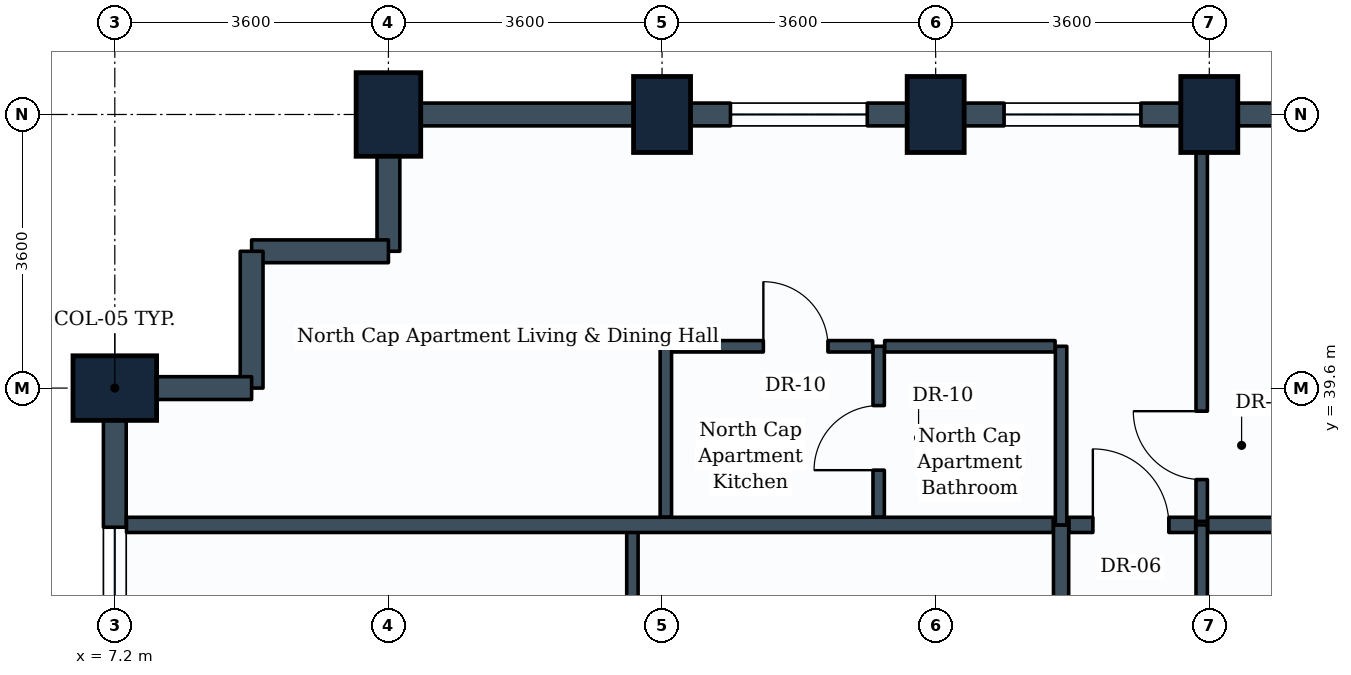
"""IFC4 building model, lengths in metres.
Left out: names, types, materials, properties, quantities, classifications, styles, units other than length and angle.
Written with IfcOpenShell. Run it as: python <this file> out.ifc"""

import sys

from ifc_helpers import new_model, si_unit, direction, frame, frame_2d, origin, origin_2d, place, context, subcontext, project, spatial, rectangle, extrude, element, fill, save


model = new_model("IFC4")
c1 = context("Model", 3, precision=1e-05, world=origin(), true_north=direction((0.0, 1.0)))
c2 = subcontext(c1, "Body", "Model", "MODEL_VIEW")
j1 = project(units=[si_unit("LENGTHUNIT", "METRE"), si_unit("PLANEANGLEUNIT", "RADIAN")], contexts=[c1])
p1 = place(None, origin())
s1 = spatial("IfcSite", under=j1, at=p1, CompositionType="ELEMENT")
p2 = place(p1, origin())
s2 = spatial("IfcBuilding", under=s1, at=p2, CompositionType="ELEMENT")
p3 = place(p2, frame((0.0, 0.0, 142.8)))
s3 = spatial("IfcBuildingStorey", under=s2, at=p3, CompositionType="ELEMENT", Elevation=142.8)
for number, where, z_axis, x_axis in (
    (1, (7.2, 39.6, 0.0), (0.0, 0.0, 1.0), (0.0, 1.0, 0.0)),
    (2, (10.8, 43.2, 0.0), (0.0, 0.0, 1.0), (1.0, 0.0, 0.0)),
):
    element("IfcColumn", number, at=place(p3, frame(where, z_axis=z_axis, x_axis=x_axis)), inside=s3, PredefinedType="COLUMN", context=c2, shape_type="SweptSolid", body=[
        extrude(rectangle(XDim=0.85, YDim=1.1, at=origin_2d()), origin(), (0.0, 0.0, 1.0), 3.8),
    ])
for number, where, z_axis, x_axis in (
    (3, (14.4, 43.2, 0.0), (0.0, 0.0, 1.0), (1.0, 0.0, 0.0)),
    (4, (18.0, 43.2, 0.0), (0.0, 0.0, 1.0), (1.0, 0.0, 0.0)),
    (5, (21.6, 43.2, 0.0), (0.0, 0.0, 1.0), (1.0, 0.0, 0.0)),
):
    element("IfcColumn", number, at=place(p3, frame(where, z_axis=z_axis, x_axis=x_axis)), inside=s3, PredefinedType="COLUMN", context=c2, shape_type="SweptSolid", body=[
        extrude(rectangle(XDim=0.75, YDim=1.0, at=origin_2d()), origin(), (0.0, 0.0, 1.0), 3.8),
    ])
p4 = place(p3, frame((21.6, 43.2, 0.0), z_axis=(0.0, 0.0, 1.0), x_axis=(1.0, 0.0, 0.0)))
e6 = element("IfcWall", 6, at=p4, inside=s3, PredefinedType="STANDARD", context=c2, shape_type="SweptSolid", body=[
    extrude(rectangle(XDim=3.6, YDim=0.3, at=frame_2d((1.8, 0.0))), origin(), (0.0, 0.0, 1.0), 2.93),
])
p5 = place(p4, frame((0.875, 0.0, 0.85)))
e7 = element("IfcOpeningElement", 7, at=p5, cuts=e6, PredefinedType="OPENING", context=c2, shape_type="SweptSolid", body=[
    extrude(rectangle(XDim=1.8, YDim=1.35, at=frame_2d((0.9, 0.675))), frame((0.0, 0.16, 0.0), z_axis=(0.0, -1.0, 0.0), x_axis=(1.0, 0.0, 0.0)), (0.0, 0.0, 1.0), 0.32),
])
p6 = place(p3, frame((18.0, 43.2, 0.0), z_axis=(0.0, 0.0, 1.0), x_axis=(1.0, 0.0, 0.0)))
e8 = element("IfcWall", 8, at=p6, inside=s3, PredefinedType="STANDARD", context=c2, shape_type="SweptSolid", body=[
    extrude(rectangle(XDim=3.6, YDim=0.3, at=frame_2d((1.8, 0.0))), origin(), (0.0, 0.0, 1.0), 2.93),
])
p7 = place(p6, frame((0.9, 0.0, 0.85)))
e9 = element("IfcOpeningElement", 9, at=p7, cuts=e8, PredefinedType="OPENING", context=c2, shape_type="SweptSolid", body=[
    extrude(rectangle(XDim=1.8, YDim=1.35, at=frame_2d((0.9, 0.675))), frame((0.0, 0.16, 0.0), z_axis=(0.0, -1.0, 0.0), x_axis=(1.0, 0.0, 0.0)), (0.0, 0.0, 1.0), 0.32),
])
p8 = place(p3, frame((14.4, 43.2, 0.0), z_axis=(0.0, 0.0, 1.0), x_axis=(1.0, 0.0, 0.0)))
e10 = element("IfcWall", 10, at=p8, inside=s3, PredefinedType="STANDARD", context=c2, shape_type="SweptSolid", body=[
    extrude(rectangle(XDim=3.6, YDim=0.3, at=frame_2d((1.8, 0.0))), origin(), (0.0, 0.0, 1.0), 2.93),
])
p9 = place(p8, frame((0.9, 0.0, 0.85)))
e11 = element("IfcOpeningElement", 11, at=p9, cuts=e10, PredefinedType="OPENING", context=c2, shape_type="SweptSolid", body=[
    extrude(rectangle(XDim=1.8, YDim=1.35, at=frame_2d((0.9, 0.675))), frame((0.0, 0.16, 0.0), z_axis=(0.0, -1.0, 0.0), x_axis=(1.0, 0.0, 0.0)), (0.0, 0.0, 1.0), 0.32),
])
p10 = place(p3, frame((10.8, 43.2, 0.0), z_axis=(0.0, 0.0, 1.0), x_axis=(1.0, 0.0, 0.0)))
e12 = element("IfcWall", 12, at=p10, inside=s3, PredefinedType="STANDARD", context=c2, shape_type="SweptSolid", body=[
    extrude(rectangle(XDim=3.6, YDim=0.3, at=frame_2d((1.8, 0.0))), origin(), (0.0, 0.0, 1.0), 2.93),
])
p11 = place(p3, frame((10.8, 41.4, 0.0), z_axis=(0.0, 0.0, 1.0), x_axis=(0.0, 1.0, 0.0)))
e13 = element("IfcWall", 13, at=p11, inside=s3, PredefinedType="STANDARD", context=c2, shape_type="SweptSolid", body=[
    extrude(rectangle(XDim=1.8, YDim=0.3, at=frame_2d((0.9, 0.0))), origin(), (0.0, 0.0, 1.0), 2.93),
])
p12 = place(p3, frame((9.0, 41.4, 0.0), z_axis=(0.0, 0.0, 1.0), x_axis=(1.0, 0.0, 0.0)))
e14 = element("IfcWall", 14, at=p12, inside=s3, PredefinedType="STANDARD", context=c2, shape_type="SweptSolid", body=[
    extrude(rectangle(XDim=1.8, YDim=0.3, at=frame_2d((0.9, 0.0))), origin(), (0.0, 0.0, 1.0), 3.535),
])
p13 = place(p3, frame((9.0, 39.6, 0.0), z_axis=(0.0, 0.0, 1.0), x_axis=(0.0, 1.0, 0.0)))
e15 = element("IfcWall", 15, at=p13, inside=s3, PredefinedType="STANDARD", context=c2, shape_type="SweptSolid", body=[
    extrude(rectangle(XDim=1.8, YDim=0.3, at=frame_2d((0.9, 0.0))), origin(), (0.0, 0.0, 1.0), 3.535),
])
p14 = place(p3, frame((7.2, 39.6, 0.0), z_axis=(0.0, 0.0, 1.0), x_axis=(1.0, 0.0, 0.0)))
e16 = element("IfcWall", 16, at=p14, inside=s3, PredefinedType="STANDARD", context=c2, shape_type="SweptSolid", body=[
    extrude(rectangle(XDim=1.8, YDim=0.3, at=frame_2d((0.9, 0.0))), origin(), (0.0, 0.0, 1.0), 2.93),
])
p15 = place(p3, frame((7.2, 36.0, 0.0), z_axis=(0.0, 0.0, 1.0), x_axis=(0.0, 1.0, 0.0)))
e17 = element("IfcWall", 17, at=p15, inside=s3, PredefinedType="STANDARD", context=c2, shape_type="SweptSolid", body=[
    extrude(rectangle(XDim=3.6, YDim=0.3, at=frame_2d((1.8, 0.0))), origin(), (0.0, 0.0, 1.0), 2.93),
])
p16 = place(p15, frame((0.769, 0.0, 0.85)))
e18 = element("IfcOpeningElement", 18, at=p16, cuts=e17, PredefinedType="OPENING", context=c2, shape_type="SweptSolid", body=[
    extrude(rectangle(XDim=1.0, YDim=1.35, at=frame_2d((0.5, 0.675))), frame((0.0, 0.16, 0.0), z_axis=(0.0, -1.0, 0.0), x_axis=(1.0, 0.0, 0.0)), (0.0, 0.0, 1.0), 0.32),
])
p17 = place(p3, frame((19.65, 33.7, 0.0), z_axis=(0.0, 0.0, 1.0), x_axis=(0.0, 1.0, 0.0)))
e19 = element("IfcWall", 19, at=p17, inside=s3, PredefinedType="PARTITIONING", context=c2, shape_type="SweptSolid", body=[
    extrude(rectangle(XDim=4.1, YDim=0.2, at=frame_2d((2.05, 0.0))), origin(), (0.0, 0.0, 1.0), 3.17),
])
p18 = place(p17, frame((1.55, 0.0, 0.0)))
e20 = element("IfcOpeningElement", 20, at=p18, cuts=e19, PredefinedType="OPENING", context=c2, shape_type="SweptSolid", body=[
    extrude(rectangle(XDim=1.0, YDim=2.1, at=frame_2d((0.5, 1.05))), frame((0.0, 0.11, 0.0), z_axis=(0.0, -1.0, 0.0), x_axis=(1.0, 0.0, 0.0)), (0.0, 0.0, 1.0), 0.22),
])
p19 = place(p3, frame((14.01, 33.9, 0.0), z_axis=(0.0, 0.0, 1.0), x_axis=(0.0, 1.0, 0.0)))
e21 = element("IfcWall", 21, at=p19, inside=s3, PredefinedType="PARTITIONING", context=c2, shape_type="SweptSolid", body=[
    extrude(rectangle(XDim=3.9, YDim=0.15, at=frame_2d((1.95, 0.0))), origin(), (0.0, 0.0, 1.0), 3.17),
])
p20 = place(p19, frame((1.461, 0.0, 0.0)))
e22 = element("IfcOpeningElement", 22, at=p20, cuts=e21, PredefinedType="OPENING", context=c2, shape_type="SweptSolid", body=[
    extrude(rectangle(XDim=0.9, YDim=2.1, at=frame_2d((0.45, 1.05))), frame((0.0, 0.085, 0.0), z_axis=(0.0, -1.0, 0.0), x_axis=(1.0, 0.0, 0.0)), (0.0, 0.0, 1.0), 0.17),
])
p21 = place(p3, frame((21.5, 32.379, 0.0), z_axis=(0.0, 0.0, 1.0), x_axis=(0.0, 1.0, 0.0)))
e23 = element("IfcWall", 23, at=p21, inside=s3, PredefinedType="PARTITIONING", context=c2, shape_type="SweptSolid", body=[
    extrude(rectangle(XDim=5.421, YDim=0.15, at=frame_2d((2.71, 0.0))), origin(), (0.0, 0.0, 1.0), 3.17),
])
p22 = place(p21, frame((2.171, 0.0, 0.0)))
e24 = element("IfcOpeningElement", 24, at=p22, cuts=e23, PredefinedType="OPENING", context=c2, shape_type="SweptSolid", body=[
    extrude(rectangle(XDim=1.0, YDim=2.1, at=frame_2d((0.5, 1.05))), frame((0.0, 0.085, 0.0), z_axis=(0.0, -1.0, 0.0), x_axis=(1.0, 0.0, 0.0)), (0.0, 0.0, 1.0), 0.17),
])
p23 = place(p3, frame((7.354, 37.8, 0.0), z_axis=(0.0, 0.0, 1.0), x_axis=(1.0, 0.0, 0.0)))
e25 = element("IfcWall", 25, at=p23, inside=s3, PredefinedType="PARTITIONING", context=c2, shape_type="SweptSolid", body=[
    extrude(rectangle(XDim=12.192, YDim=0.2, at=frame_2d((6.096, 0.0))), origin(), (0.0, 0.0, 1.0), 2.93),
])
p24 = place(p3, frame((21.579, 37.8, 0.0), z_axis=(0.0, 0.0, 1.0), x_axis=(1.0, 0.0, 0.0)))
e26 = element("IfcWall", 26, at=p24, inside=s3, PredefinedType="PARTITIONING", context=c2, shape_type="SweptSolid", body=[
    extrude(rectangle(XDim=5.121, YDim=0.2, at=frame_2d((2.561, 0.0))), origin(), (0.0, 0.0, 1.0), 3.535),
])
p25 = place(p3, frame((19.754, 37.8, 0.0), z_axis=(0.0, 0.0, 1.0), x_axis=(1.0, 0.0, 0.0)))
e27 = element("IfcWall", 27, at=p25, inside=s3, PredefinedType="PARTITIONING", context=c2, shape_type="SweptSolid", body=[
    extrude(rectangle(XDim=1.667, YDim=0.2, at=frame_2d((0.833, 0.0))), origin(), (0.0, 0.0, 1.0), 3.535),
])
p26 = place(p25, frame((0.314, 0.0, 0.0)))
e28 = element("IfcOpeningElement", 28, at=p26, cuts=e27, PredefinedType="OPENING", context=c2, shape_type="SweptSolid", body=[
    extrude(rectangle(XDim=1.0, YDim=2.1, at=frame_2d((0.5, 1.05))), frame((0.0, 0.11, 0.0), z_axis=(0.0, -1.0, 0.0), x_axis=(1.0, 0.0, 0.0)), (0.0, 0.0, 1.0), 0.22),
])
p27 = place(p3, frame((19.65, 37.8, 0.0), z_axis=(0.0, 0.0, 1.0), x_axis=(0.0, 1.0, 0.0)))
e29 = element("IfcWall", 29, at=p27, inside=s3, PredefinedType="PARTITIONING", context=c2, shape_type="SweptSolid", body=[
    extrude(rectangle(XDim=2.35, YDim=0.15, at=frame_2d((1.175, 0.0))), origin(), (0.0, 0.0, 1.0), 3.535),
])
p28 = place(p3, frame((17.25, 37.904, 0.0), z_axis=(0.0, 0.0, 1.0), x_axis=(0.0, 1.0, 0.0)))
e30 = element("IfcWall", 30, at=p28, inside=s3, PredefinedType="PARTITIONING", context=c2, shape_type="SweptSolid", body=[
    extrude(rectangle(XDim=2.246, YDim=0.15, at=frame_2d((1.123, 0.0))), origin(), (0.0, 0.0, 1.0), 3.535),
])
p29 = place(p28, frame((0.616, 0.0, 0.0)))
e31 = element("IfcOpeningElement", 31, at=p29, cuts=e30, PredefinedType="OPENING", context=c2, shape_type="SweptSolid", body=[
    extrude(rectangle(XDim=0.85, YDim=2.1, at=frame_2d((0.425, 1.05))), frame((0.0, 0.085, 0.0), z_axis=(0.0, -1.0, 0.0), x_axis=(1.0, 0.0, 0.0)), (0.0, 0.0, 1.0), 0.17),
])
p30 = place(p3, frame((17.329, 40.15, 0.0), z_axis=(0.0, 0.0, 1.0), x_axis=(1.0, 0.0, 0.0)))
e32 = element("IfcWall", 32, at=p30, inside=s3, PredefinedType="PARTITIONING", context=c2, shape_type="SweptSolid", body=[
    extrude(rectangle(XDim=2.242, YDim=0.15, at=frame_2d((1.121, 0.0))), origin(), (0.0, 0.0, 1.0), 3.17),
])
p31 = place(p3, frame((21.5, 37.846, 0.0), z_axis=(0.0, 0.0, 1.0), x_axis=(0.0, 1.0, 0.0)))
e33 = element("IfcWall", 33, at=p31, inside=s3, PredefinedType="PARTITIONING", context=c2, shape_type="SweptSolid", body=[
    extrude(rectangle(XDim=5.2, YDim=0.15, at=frame_2d((2.6, 0.0))), origin(), (0.0, 0.0, 1.0), 2.93),
])
p32 = place(p31, frame((0.55, 0.0, 0.0)))
e34 = element("IfcOpeningElement", 34, at=p32, cuts=e33, PredefinedType="OPENING", context=c2, shape_type="SweptSolid", body=[
    extrude(rectangle(XDim=0.9, YDim=2.1, at=frame_2d((0.45, 1.05))), frame((0.0, 0.085, 0.0), z_axis=(0.0, -1.0, 0.0), x_axis=(1.0, 0.0, 0.0)), (0.0, 0.0, 1.0), 0.17),
])
p33 = place(p3, frame((14.45, 37.904, 0.0), z_axis=(0.0, 0.0, 1.0), x_axis=(0.0, 1.0, 0.0)))
e35 = element("IfcWall", 35, at=p33, inside=s3, PredefinedType="PARTITIONING", context=c2, shape_type="SweptSolid", body=[
    extrude(rectangle(XDim=2.246, YDim=0.15, at=frame_2d((1.123, 0.0))), origin(), (0.0, 0.0, 1.0), 3.535),
])
p34 = place(p3, frame((14.529, 40.15, 0.0), z_axis=(0.0, 0.0, 1.0), x_axis=(1.0, 0.0, 0.0)))
e36 = element("IfcWall", 36, at=p34, inside=s3, PredefinedType="PARTITIONING", context=c2, shape_type="SweptSolid", body=[
    extrude(rectangle(XDim=2.642, YDim=0.15, at=frame_2d((1.321, 0.0))), origin(), (0.0, 0.0, 1.0), 3.535),
])
p35 = place(p34, frame((1.204, 0.0, 0.0)))
e37 = element("IfcOpeningElement", 37, at=p35, cuts=e36, PredefinedType="OPENING", context=c2, shape_type="SweptSolid", body=[
    extrude(rectangle(XDim=0.85, YDim=2.1, at=frame_2d((0.425, 1.05))), frame((0.0, 0.085, 0.0), z_axis=(0.0, -1.0, 0.0), x_axis=(1.0, 0.0, 0.0)), (0.0, 0.0, 1.0), 0.17),
])
p36 = place(p7, origin())
e38 = element("IfcWindow", 38, at=p36, inside=s3, PartitioningType="SINGLE_PANEL", PredefinedType="WINDOW", context=c2, shape_type="SweptSolid", body=[
    extrude(rectangle(XDim=1.8, YDim=1.35, at=frame_2d((0.9, 0.675))), frame((0.0, 0.03, 0.0), z_axis=(0.0, -1.0, 0.0), x_axis=(1.0, 0.0, 0.0)), (0.0, 0.0, 1.0), 0.06),
])
fill(e9, e38)
p37 = place(p9, origin())
e39 = element("IfcWindow", 39, at=p37, inside=s3, PartitioningType="SINGLE_PANEL", PredefinedType="WINDOW", context=c2, shape_type="SweptSolid", body=[
    extrude(rectangle(XDim=1.8, YDim=1.35, at=frame_2d((0.9, 0.675))), frame((0.0, 0.03, 0.0), z_axis=(0.0, -1.0, 0.0), x_axis=(1.0, 0.0, 0.0)), (0.0, 0.0, 1.0), 0.06),
])
fill(e11, e39)
p38 = place(p26, origin())
e40 = element("IfcDoor", 40, at=p38, inside=s3, OperationType="SINGLE_SWING_LEFT", PredefinedType="DOOR", context=c2, shape_type="SweptSolid", body=[
    extrude(rectangle(XDim=1.0, YDim=2.1, at=frame_2d((0.5, 1.05))), frame((0.0, 0.025, 0.0), z_axis=(0.0, -1.0, 0.0), x_axis=(1.0, 0.0, 0.0)), (0.0, 0.0, 1.0), 0.05),
])
fill(e28, e40)
p39 = place(p29, origin())
e41 = element("IfcDoor", 41, at=p39, inside=s3, OperationType="SINGLE_SWING_LEFT", PredefinedType="DOOR", context=c2, shape_type="SweptSolid", body=[
    extrude(rectangle(XDim=0.85, YDim=2.1, at=frame_2d((0.425, 1.05))), frame((0.0, 0.025, 0.0), z_axis=(0.0, -1.0, 0.0), x_axis=(1.0, 0.0, 0.0)), (0.0, 0.0, 1.0), 0.05),
])
fill(e31, e41)
p40 = place(p32, origin())
e42 = element("IfcDoor", 42, at=p40, inside=s3, OperationType="SINGLE_SWING_RIGHT", PredefinedType="DOOR", context=c2, shape_type="SweptSolid", body=[
    extrude(rectangle(XDim=0.9, YDim=2.1, at=frame_2d((0.45, 1.05))), frame((0.0, 0.025, 0.0), z_axis=(0.0, -1.0, 0.0), x_axis=(1.0, 0.0, 0.0)), (0.0, 0.0, 1.0), 0.05),
])
fill(e34, e42)
p41 = place(p35, origin())
e43 = element("IfcDoor", 43, at=p41, inside=s3, OperationType="SINGLE_SWING_LEFT", PredefinedType="DOOR", context=c2, shape_type="SweptSolid", body=[
    extrude(rectangle(XDim=0.85, YDim=2.1, at=frame_2d((0.425, 1.05))), frame((0.0, 0.025, 0.0), z_axis=(0.0, -1.0, 0.0), x_axis=(1.0, 0.0, 0.0)), (0.0, 0.0, 1.0), 0.05),
])
fill(e37, e43)
p42 = place(p16, origin())
e44 = element("IfcWindow", 44, at=p42, inside=s3, PartitioningType="SINGLE_PANEL", PredefinedType="WINDOW", context=c2, shape_type="SweptSolid", body=[
    extrude(rectangle(XDim=1.0, YDim=1.35, at=frame_2d((0.5, 0.675))), frame((0.0, 0.03, 0.0), z_axis=(0.0, -1.0, 0.0), x_axis=(1.0, 0.0, 0.0)), (0.0, 0.0, 1.0), 0.06),
])
fill(e18, e44)
save(model, sys.argv[1])
